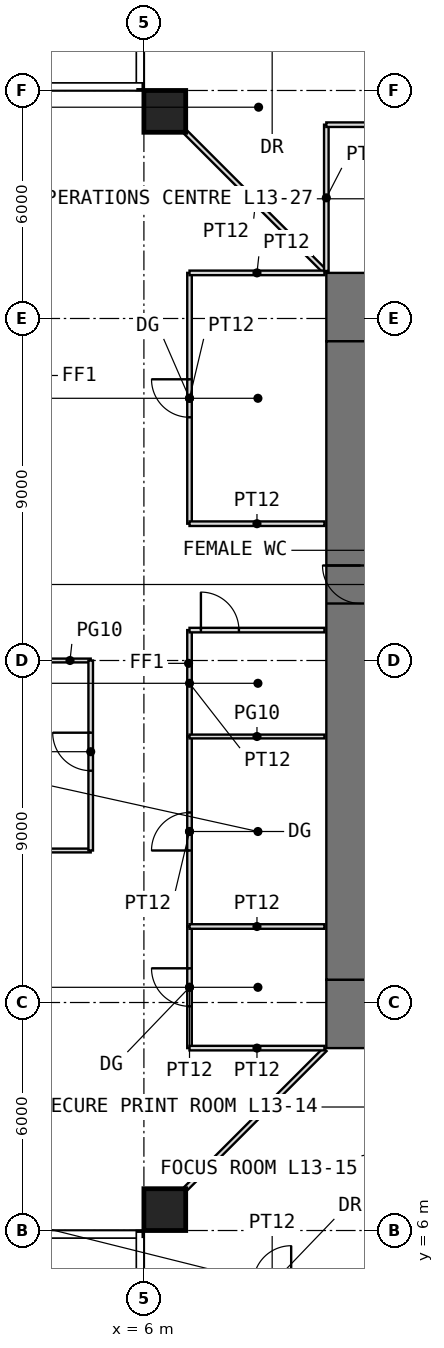
"""IFC4 building model, lengths in metres.
Left out: names, types, materials, properties, quantities, classifications, styles, units other than length and angle.
Written with IfcOpenShell. Run it as: python <this file> out.ifc"""

import sys

from ifc_helpers import new_model, si_unit, direction, frame, frame_2d, origin, origin_2d, place, context, subcontext, project, spatial, rectangle, extrude, element, fill, save


model = new_model("IFC4")
c1 = context("Model", 3, precision=1e-05, world=origin(), true_north=direction((0.0, 1.0)))
c2 = subcontext(c1, "Body", "Model", "MODEL_VIEW")
j1 = project(units=[si_unit("LENGTHUNIT", "METRE"), si_unit("PLANEANGLEUNIT", "RADIAN")], contexts=[c1])
p1 = place(None, origin())
s1 = spatial("IfcSite", under=j1, at=p1, CompositionType="ELEMENT")
p2 = place(p1, origin())
s2 = spatial("IfcBuilding", under=s1, at=p2, CompositionType="ELEMENT")
p3 = place(p2, frame((0.0, 0.0, 58.5)))
s3 = spatial("IfcBuildingStorey", under=s2, at=p3, CompositionType="ELEMENT", Elevation=58.5)
for number, where, z_axis, x_axis in (
    (1, (6.55, 6.55, 0.0), (0.0, 0.0, 1.0), (1.0, 0.0, 0.0)),
    (2, (6.55, 35.45, 0.0), (0.0, 0.0, 1.0), (1.0, 0.0, 0.0)),
):
    element("IfcColumn", number, at=place(p3, frame(where, z_axis=z_axis, x_axis=x_axis)), inside=s3, PredefinedType="COLUMN", context=c2, shape_type="SweptSolid", body=[
        extrude(rectangle(XDim=1.1, YDim=1.1, at=origin_2d()), origin(), (0.0, 0.0, 1.0), 4.0),
    ])
p4 = place(p3, frame((10.8, 11.7, -0.05), z_axis=(0.0, 0.0, 1.0), x_axis=(1.0, 0.0, 0.0)))
e3 = element("IfcWall", 3, at=p4, inside=s3, PredefinedType="SHEAR", context=c2, shape_type="SweptSolid", body=[
    extrude(rectangle(XDim=20.4, YDim=1.8, at=frame_2d((10.2, 0.0))), origin(), (0.0, 0.0, 1.0), 4.0),
])
p5 = place(p4, frame((9.2, 0.0, 0.05)))
e4 = element("IfcOpeningElement", 4, at=p5, cuts=e3, PredefinedType="OPENING", context=c2, shape_type="SweptSolid", body=[
    extrude(rectangle(XDim=2.0, YDim=2.2, at=frame_2d((1.0, 1.1))), frame((0.0, 0.91, 0.0), z_axis=(0.0, -1.0, 0.0), x_axis=(1.0, 0.0, 0.0)), (0.0, 0.0, 1.0), 1.82),
])
p6 = place(p3, frame((10.8, 30.3, -0.05), z_axis=(0.0, 0.0, 1.0), x_axis=(1.0, 0.0, 0.0)))
e5 = element("IfcWall", 5, at=p6, inside=s3, PredefinedType="SHEAR", context=c2, shape_type="SweptSolid", body=[
    extrude(rectangle(XDim=20.4, YDim=1.8, at=frame_2d((10.2, 0.0))), origin(), (0.0, 0.0, 1.0), 4.0),
])
p7 = place(p6, frame((9.2, 0.0, 0.05)))
e6 = element("IfcOpeningElement", 6, at=p7, cuts=e5, PredefinedType="OPENING", context=c2, shape_type="SweptSolid", body=[
    extrude(rectangle(XDim=2.0, YDim=2.2, at=frame_2d((1.0, 1.1))), frame((0.0, 0.91, 0.0), z_axis=(0.0, -1.0, 0.0), x_axis=(1.0, 0.0, 0.0)), (0.0, 0.0, 1.0), 1.82),
])
p8 = place(p3, frame((11.7, 12.6, -0.05), z_axis=(0.0, 0.0, 1.0), x_axis=(0.0, 1.0, 0.0)))
e7 = element("IfcWall", 7, at=p8, inside=s3, PredefinedType="SHEAR", context=c2, shape_type="SweptSolid", body=[
    extrude(rectangle(XDim=16.8, YDim=1.8, at=frame_2d((8.4, 0.0))), origin(), (0.0, 0.0, 1.0), 4.0),
])
p9 = place(p8, frame((9.9, 0.0, 0.05)))
e8 = element("IfcOpeningElement", 8, at=p9, cuts=e7, PredefinedType="OPENING", context=c2, shape_type="SweptSolid", body=[
    extrude(rectangle(XDim=1.0, YDim=2.2, at=frame_2d((0.5, 1.1))), frame((0.0, 0.91, 0.0), z_axis=(0.0, -1.0, 0.0), x_axis=(1.0, 0.0, 0.0)), (0.0, 0.0, 1.0), 1.82),
])
p10 = place(p3, frame((1.41, 16.0, 0.0), z_axis=(0.0, 0.0, 1.0), x_axis=(1.0, 0.0, 0.0)))
e9 = element("IfcWall", 9, at=p10, inside=s3, PredefinedType="PARTITIONING", context=c2, shape_type="SweptSolid", body=[
    extrude(rectangle(XDim=3.19, YDim=0.1, at=frame_2d((1.595, 0.0))), origin(), (0.0, 0.0, 1.0), 3.75),
])
p11 = place(p3, frame((3.51, 21.0, 0.0), z_axis=(0.0, 0.0, 1.0), x_axis=(1.0, 0.0, 0.0)))
e10 = element("IfcWall", 10, at=p11, inside=s3, PredefinedType="PARTITIONING", context=c2, shape_type="SweptSolid", body=[
    extrude(rectangle(XDim=1.09, YDim=0.1, at=frame_2d((0.545, 0.0))), origin(), (0.0, 0.0, 1.0), 3.75),
])
p12 = place(p3, frame((4.6, 16.0, 0.0), z_axis=(0.0, 0.0, 1.0), x_axis=(0.0, 1.0, 0.0)))
e11 = element("IfcWall", 11, at=p12, inside=s3, PredefinedType="PARTITIONING", context=c2, shape_type="SweptSolid", body=[
    extrude(rectangle(XDim=5.0, YDim=0.12, at=frame_2d((2.5, 0.0))), origin(), (0.0, 0.0, 1.0), 3.75),
])
p13 = place(p12, frame((2.1, 0.0, 0.0)))
e12 = element("IfcOpeningElement", 12, at=p13, cuts=e11, PredefinedType="OPENING", context=c2, shape_type="SweptSolid", body=[
    extrude(rectangle(XDim=1.0, YDim=2.4, at=frame_2d((0.5, 1.2))), frame((0.0, 0.07, 0.0), z_axis=(0.0, -1.0, 0.0), x_axis=(1.0, 0.0, 0.0)), (0.0, 0.0, 1.0), 0.14),
])
for number, where, z_axis, x_axis in (
    (13, (7.11, 7.11, 0.0), (0.0, 0.0, 1.0), (0.707, 0.707, 0.0)),
    (14, (7.11, 34.89, 0.0), (0.0, 0.0, 1.0), (0.707, -0.707, 0.0)),
):
    element("IfcWall", number, at=place(p3, frame(where, z_axis=z_axis, x_axis=x_axis)), inside=s3, PredefinedType="PARTITIONING", context=c2, shape_type="SweptSolid", body=[
        extrude(rectangle(XDim=5.168, YDim=0.12, at=frame_2d((2.584, 0.0))), origin(), (0.0, 0.0, 1.0), 3.75),
    ])
p14 = place(p3, frame((7.2, 10.8, 0.0), z_axis=(0.0, 0.0, 1.0), x_axis=(0.0, 1.0, 0.0)))
e15 = element("IfcWall", 15, at=p14, inside=s3, PredefinedType="PARTITIONING", context=c2, shape_type="SweptSolid", body=[
    extrude(rectangle(XDim=3.2, YDim=0.12, at=frame_2d((1.6, 0.0))), origin(), (0.0, 0.0, 1.0), 3.75),
])
p15 = place(p14, frame((1.1, 0.0, 0.0)))
e16 = element("IfcOpeningElement", 16, at=p15, cuts=e15, PredefinedType="OPENING", context=c2, shape_type="SweptSolid", body=[
    extrude(rectangle(XDim=1.0, YDim=2.4, at=frame_2d((0.5, 1.2))), frame((0.0, 0.07, 0.0), z_axis=(0.0, -1.0, 0.0), x_axis=(1.0, 0.0, 0.0)), (0.0, 0.0, 1.0), 0.14),
])
p16 = place(p3, frame((7.2, 10.8, 0.0), z_axis=(0.0, 0.0, 1.0), x_axis=(1.0, 0.0, 0.0)))
e17 = element("IfcWall", 17, at=p16, inside=s3, PredefinedType="PARTITIONING", context=c2, shape_type="SweptSolid", body=[
    extrude(rectangle(XDim=3.55, YDim=0.12, at=frame_2d((1.775, 0.0))), origin(), (0.0, 0.0, 1.0), 3.75),
])
p17 = place(p3, frame((7.2, 14.0, 0.0), z_axis=(0.0, 0.0, 1.0), x_axis=(0.0, 1.0, 0.0)))
e18 = element("IfcWall", 18, at=p17, inside=s3, PredefinedType="PARTITIONING", context=c2, shape_type="SweptSolid", body=[
    extrude(rectangle(XDim=5.0, YDim=0.12, at=frame_2d((2.5, 0.0))), origin(), (0.0, 0.0, 1.0), 3.75),
])
p18 = place(p17, frame((2.0, 0.0, 0.0)))
e19 = element("IfcOpeningElement", 19, at=p18, cuts=e18, PredefinedType="OPENING", context=c2, shape_type="SweptSolid", body=[
    extrude(rectangle(XDim=1.0, YDim=2.4, at=frame_2d((0.5, 1.2))), frame((0.0, 0.07, 0.0), z_axis=(0.0, -1.0, 0.0), x_axis=(1.0, 0.0, 0.0)), (0.0, 0.0, 1.0), 0.14),
])
p19 = place(p3, frame((7.2, 14.0, 0.0), z_axis=(0.0, 0.0, 1.0), x_axis=(1.0, 0.0, 0.0)))
e20 = element("IfcWall", 20, at=p19, inside=s3, PredefinedType="PARTITIONING", context=c2, shape_type="SweptSolid", body=[
    extrude(rectangle(XDim=3.55, YDim=0.12, at=frame_2d((1.775, 0.0))), origin(), (0.0, 0.0, 1.0), 3.75),
])
p20 = place(p3, frame((7.2, 19.0, 0.0), z_axis=(0.0, 0.0, 1.0), x_axis=(0.0, 1.0, 0.0)))
e21 = element("IfcWall", 21, at=p20, inside=s3, PredefinedType="PARTITIONING", context=c2, shape_type="SweptSolid", body=[
    extrude(rectangle(XDim=2.8, YDim=0.12, at=frame_2d((1.4, 0.0))), origin(), (0.0, 0.0, 1.0), 3.75),
])
p21 = place(p3, frame((7.2, 19.0, 0.0), z_axis=(0.0, 0.0, 1.0), x_axis=(1.0, 0.0, 0.0)))
e22 = element("IfcWall", 22, at=p21, inside=s3, PredefinedType="PARTITIONING", context=c2, shape_type="SweptSolid", body=[
    extrude(rectangle(XDim=3.55, YDim=0.1, at=frame_2d((1.775, 0.0))), origin(), (0.0, 0.0, 1.0), 3.75),
])
p22 = place(p3, frame((7.2, 21.8, 0.0), z_axis=(0.0, 0.0, 1.0), x_axis=(1.0, 0.0, 0.0)))
e23 = element("IfcWall", 23, at=p22, inside=s3, PredefinedType="PARTITIONING", context=c2, shape_type="SweptSolid", body=[
    extrude(rectangle(XDim=3.55, YDim=0.12, at=frame_2d((1.775, 0.0))), origin(), (0.0, 0.0, 1.0), 3.75),
])
p23 = place(p22, frame((0.3, 0.0, 0.0)))
e24 = element("IfcOpeningElement", 24, at=p23, cuts=e23, PredefinedType="OPENING", context=c2, shape_type="SweptSolid", body=[
    extrude(rectangle(XDim=1.0, YDim=2.4, at=frame_2d((0.5, 1.2))), frame((0.0, 0.07, 0.0), z_axis=(0.0, -1.0, 0.0), x_axis=(1.0, 0.0, 0.0)), (0.0, 0.0, 1.0), 0.14),
])
p24 = place(p3, frame((7.2, 24.6, 0.0), z_axis=(0.0, 0.0, 1.0), x_axis=(0.0, 1.0, 0.0)))
e25 = element("IfcWall", 25, at=p24, inside=s3, PredefinedType="PARTITIONING", context=c2, shape_type="SweptSolid", body=[
    extrude(rectangle(XDim=6.6, YDim=0.12, at=frame_2d((3.3, 0.0))), origin(), (0.0, 0.0, 1.0), 3.75),
])
p25 = place(p24, frame((2.8, 0.0, 0.0)))
e26 = element("IfcOpeningElement", 26, at=p25, cuts=e25, PredefinedType="OPENING", context=c2, shape_type="SweptSolid", body=[
    extrude(rectangle(XDim=1.0, YDim=2.4, at=frame_2d((0.5, 1.2))), frame((0.0, 0.07, 0.0), z_axis=(0.0, -1.0, 0.0), x_axis=(1.0, 0.0, 0.0)), (0.0, 0.0, 1.0), 0.14),
])
for number, where, z_axis, x_axis in (
    (27, (7.2, 24.6, 0.0), (0.0, 0.0, 1.0), (1.0, 0.0, 0.0)),
    (28, (7.2, 31.2, 0.0), (0.0, 0.0, 1.0), (1.0, 0.0, 0.0)),
):
    element("IfcWall", number, at=place(p3, frame(where, z_axis=z_axis, x_axis=x_axis)), inside=s3, PredefinedType="PARTITIONING", context=c2, shape_type="SweptSolid", body=[
        extrude(rectangle(XDim=3.55, YDim=0.12, at=frame_2d((1.775, 0.0))), origin(), (0.0, 0.0, 1.0), 3.75),
    ])
p26 = place(p3, frame((10.8, 31.25, 0.0), z_axis=(0.0, 0.0, 1.0), x_axis=(0.0, 1.0, 0.0)))
e29 = element("IfcWall", 29, at=p26, inside=s3, PredefinedType="PARTITIONING", context=c2, shape_type="SweptSolid", body=[
    extrude(rectangle(XDim=3.85, YDim=0.12, at=frame_2d((1.925, 0.0))), origin(), (0.0, 0.0, 1.0), 3.75),
])
p27 = place(p3, frame((10.8, 35.1, 0.0), z_axis=(0.0, 0.0, 1.0), x_axis=(1.0, 0.0, 0.0)))
e30 = element("IfcWall", 30, at=p27, inside=s3, PredefinedType="PARTITIONING", context=c2, shape_type="SweptSolid", body=[
    extrude(rectangle(XDim=7.6, YDim=0.12, at=frame_2d((3.8, 0.0))), origin(), (0.0, 0.0, 1.0), 3.75),
])
p28 = place(p27, frame((3.3, 0.0, 0.0)))
e31 = element("IfcOpeningElement", 31, at=p28, cuts=e30, PredefinedType="OPENING", context=c2, shape_type="SweptSolid", body=[
    extrude(rectangle(XDim=1.0, YDim=2.2, at=frame_2d((0.5, 1.1))), frame((0.0, 0.07, 0.0), z_axis=(0.0, -1.0, 0.0), x_axis=(1.0, 0.0, 0.0)), (0.0, 0.0, 1.0), 0.14),
])
p29 = place(p9, origin())
e32 = element("IfcDoor", 32, at=p29, inside=s3, OperationType="SINGLE_SWING_RIGHT", PredefinedType="DOOR", context=c2, shape_type="SweptSolid", body=[
    extrude(rectangle(XDim=1.0, YDim=2.2, at=frame_2d((0.5, 1.1))), frame((0.0, 0.025, 0.0), z_axis=(0.0, -1.0, 0.0), x_axis=(1.0, 0.0, 0.0)), (0.0, 0.0, 1.0), 0.05),
])
fill(e8, e32)
p30 = place(p15, origin())
e33 = element("IfcDoor", 33, at=p30, inside=s3, OperationType="SINGLE_SWING_RIGHT", PredefinedType="DOOR", context=c2, shape_type="SweptSolid", body=[
    extrude(rectangle(XDim=1.0, YDim=2.4, at=frame_2d((0.5, 1.2))), frame((0.0, 0.025, 0.0), z_axis=(0.0, -1.0, 0.0), x_axis=(1.0, 0.0, 0.0)), (0.0, 0.0, 1.0), 0.05),
])
fill(e16, e33)
p31 = place(p18, origin())
e34 = element("IfcDoor", 34, at=p31, inside=s3, OperationType="SINGLE_SWING_LEFT", PredefinedType="DOOR", context=c2, shape_type="SweptSolid", body=[
    extrude(rectangle(XDim=1.0, YDim=2.4, at=frame_2d((0.5, 1.2))), frame((0.0, 0.025, 0.0), z_axis=(0.0, -1.0, 0.0), x_axis=(1.0, 0.0, 0.0)), (0.0, 0.0, 1.0), 0.05),
])
fill(e19, e34)
p32 = place(p25, origin())
e35 = element("IfcDoor", 35, at=p32, inside=s3, OperationType="SINGLE_SWING_RIGHT", PredefinedType="DOOR", context=c2, shape_type="SweptSolid", body=[
    extrude(rectangle(XDim=1.0, YDim=2.4, at=frame_2d((0.5, 1.2))), frame((0.0, 0.025, 0.0), z_axis=(0.0, -1.0, 0.0), x_axis=(1.0, 0.0, 0.0)), (0.0, 0.0, 1.0), 0.05),
])
fill(e26, e35)
p33 = place(p13, origin())
e36 = element("IfcDoor", 36, at=p33, inside=s3, OperationType="SINGLE_SWING_RIGHT", PredefinedType="DOOR", context=c2, shape_type="SweptSolid", body=[
    extrude(rectangle(XDim=1.0, YDim=2.4, at=frame_2d((0.5, 1.2))), frame((0.0, 0.025, 0.0), z_axis=(0.0, -1.0, 0.0), x_axis=(1.0, 0.0, 0.0)), (0.0, 0.0, 1.0), 0.05),
])
fill(e12, e36)
p34 = place(p23, origin())
e37 = element("IfcDoor", 37, at=p34, inside=s3, OperationType="SINGLE_SWING_LEFT", PredefinedType="DOOR", context=c2, shape_type="SweptSolid", body=[
    extrude(rectangle(XDim=1.0, YDim=2.4, at=frame_2d((0.5, 1.2))), frame((0.0, 0.025, 0.0), z_axis=(0.0, -1.0, 0.0), x_axis=(1.0, 0.0, 0.0)), (0.0, 0.0, 1.0), 0.05),
])
fill(e24, e37)
save(model, sys.argv[1])
